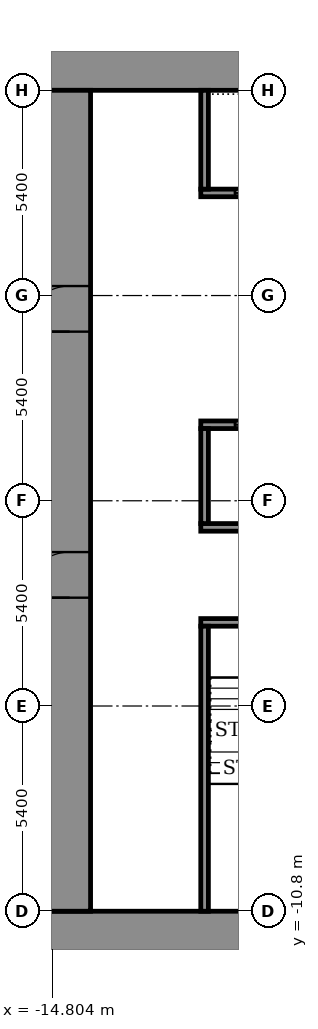
"""IFC4 building model, lengths in metres.
Left out: names, types, materials, properties, quantities, classifications, styles, units other than length and angle.
Written with IfcOpenShell. Run it as: python <this file> out.ifc"""

import sys

from ifc_helpers import new_model, si_unit, direction, frame, frame_2d, origin, place, context, subcontext, project, spatial, rectangle, extrude, element, fill, save


model = new_model("IFC4")
c1 = context("Model", 3, precision=1e-05, world=origin(), true_north=direction((0.0, 1.0)))
c2 = subcontext(c1, "Body", "Model", "MODEL_VIEW")
j1 = project(units=[si_unit("LENGTHUNIT", "METRE"), si_unit("PLANEANGLEUNIT", "RADIAN")], contexts=[c1])
p1 = place(None, origin())
s1 = spatial("IfcSite", under=j1, at=p1, CompositionType="ELEMENT")
p2 = place(p1, origin())
s2 = spatial("IfcBuilding", under=s1, at=p2, CompositionType="ELEMENT")
p3 = place(p2, frame((0.0, 0.0, 48.5)))
s3 = spatial("IfcBuildingStorey", under=s2, at=p3, CompositionType="ELEMENT", Elevation=48.5)
for number, where, z_axis, x_axis in (
    (1, (-14.9, -11.35, 0.0), (0.0, 0.0, 1.0), (1.0, 0.0, 0.0)),
    (2, (-14.9, 11.35, 0.0), (0.0, 0.0, 1.0), (1.0, 0.0, 0.0)),
):
    element("IfcWall", number, at=place(p3, frame(where, z_axis=z_axis, x_axis=x_axis)), inside=s3, PredefinedType="SHEAR", context=c2, shape_type="SweptSolid", body=[
        extrude(rectangle(XDim=29.8, YDim=1.1, at=frame_2d((14.9, 0.0))), origin(), (0.0, 0.0, 1.0), 3.6),
    ])
p4 = place(p3, frame((-14.35, -10.8, 0.0), z_axis=(0.0, 0.0, 1.0), x_axis=(0.0, 1.0, 0.0)))
e3 = element("IfcWall", 3, at=p4, inside=s3, PredefinedType="SHEAR", context=c2, shape_type="SweptSolid", body=[
    extrude(rectangle(XDim=21.6, YDim=1.1, at=frame_2d((10.8, 0.0))), origin(), (0.0, 0.0, 1.0), 3.6),
])
p5 = place(p4, frame((8.25, 0.0, 0.0)))
e4 = element("IfcOpeningElement", 4, at=p5, cuts=e3, PredefinedType="OPENING", context=c2, shape_type="SweptSolid", body=[
    extrude(rectangle(XDim=1.2, YDim=2.1, at=frame_2d((0.6, 1.05))), frame((0.0, 0.56, 0.0), z_axis=(0.0, -1.0, 0.0), x_axis=(1.0, 0.0, 0.0)), (0.0, 0.0, 1.0), 1.12),
])
p6 = place(p4, frame((15.25, 0.0, 0.0)))
e5 = element("IfcOpeningElement", 5, at=p6, cuts=e3, PredefinedType="OPENING", context=c2, shape_type="SweptSolid", body=[
    extrude(rectangle(XDim=1.2, YDim=2.1, at=frame_2d((0.6, 1.05))), frame((0.0, 0.56, 0.0), z_axis=(0.0, -1.0, 0.0), x_axis=(1.0, 0.0, 0.0)), (0.0, 0.0, 1.0), 1.12),
])
p7 = place(p3, frame((-10.9, -3.2, 0.0), z_axis=(0.0, 0.0, 1.0), x_axis=(1.0, 0.0, 0.0)))
e6 = element("IfcWall", 6, at=p7, inside=s3, PredefinedType="SHEAR", context=c2, shape_type="SweptSolid", body=[
    extrude(rectangle(XDim=21.8, YDim=0.2, at=frame_2d((10.9, 0.0))), origin(), (0.0, 0.0, 1.0), 3.05),
])
p8 = place(p7, frame((1.075, 0.0, 0.0)))
e7 = element("IfcOpeningElement", 7, at=p8, cuts=e6, PredefinedType="OPENING", context=c2, shape_type="SweptSolid", body=[
    extrude(rectangle(XDim=1.1, YDim=2.1, at=frame_2d((0.55, 1.05))), frame((0.0, 0.11, 0.0), z_axis=(0.0, -1.0, 0.0), x_axis=(1.0, 0.0, 0.0)), (0.0, 0.0, 1.0), 0.22),
])
p9 = place(p7, frame((10.325, 0.0, 0.0)))
e8 = element("IfcOpeningElement", 8, at=p9, cuts=e6, PredefinedType="OPENING", context=c2, shape_type="SweptSolid", body=[
    extrude(rectangle(XDim=1.1, YDim=2.1, at=frame_2d((0.55, 1.05))), frame((0.0, 0.11, 0.0), z_axis=(0.0, -1.0, 0.0), x_axis=(1.0, 0.0, 0.0)), (0.0, 0.0, 1.0), 0.22),
])
p10 = place(p7, frame((19.625, 0.0, 0.0)))
e9 = element("IfcOpeningElement", 9, at=p10, cuts=e6, PredefinedType="OPENING", context=c2, shape_type="SweptSolid", body=[
    extrude(rectangle(XDim=1.1, YDim=2.1, at=frame_2d((0.55, 1.05))), frame((0.0, 0.11, 0.0), z_axis=(0.0, -1.0, 0.0), x_axis=(1.0, 0.0, 0.0)), (0.0, 0.0, 1.0), 0.22),
])
p11 = place(p7, frame((5.7, 0.0, 0.0)))
e10 = element("IfcOpeningElement", 10, at=p11, cuts=e6, PredefinedType="OPENING", context=c2, shape_type="SweptSolid", body=[
    extrude(rectangle(XDim=1.1, YDim=2.1, at=frame_2d((0.55, 1.05))), frame((0.0, 0.11, 0.0), z_axis=(0.0, -1.0, 0.0), x_axis=(1.0, 0.0, 0.0)), (0.0, 0.0, 1.0), 0.22),
])
p12 = place(p7, frame((14.975, 0.0, 0.0)))
e11 = element("IfcOpeningElement", 11, at=p12, cuts=e6, PredefinedType="OPENING", context=c2, shape_type="SweptSolid", body=[
    extrude(rectangle(XDim=1.1, YDim=2.1, at=frame_2d((0.55, 1.05))), frame((0.0, 0.11, 0.0), z_axis=(0.0, -1.0, 0.0), x_axis=(1.0, 0.0, 0.0)), (0.0, 0.0, 1.0), 0.22),
])
p13 = place(p3, frame((-10.9, -0.7, 0.0), z_axis=(0.0, 0.0, 1.0), x_axis=(1.0, 0.0, 0.0)))
e12 = element("IfcWall", 12, at=p13, inside=s3, PredefinedType="SHEAR", context=c2, shape_type="SweptSolid", body=[
    extrude(rectangle(XDim=21.8, YDim=0.2, at=frame_2d((10.9, 0.0))), origin(), (0.0, 0.0, 1.0), 3.05),
])
p14 = place(p3, frame((-10.9, 2.0, 0.0), z_axis=(0.0, 0.0, 1.0), x_axis=(1.0, 0.0, 0.0)))
e13 = element("IfcWall", 13, at=p14, inside=s3, PredefinedType="SHEAR", context=c2, shape_type="SweptSolid", body=[
    extrude(rectangle(XDim=21.8, YDim=0.2, at=frame_2d((10.9, 0.0))), origin(), (0.0, 0.0, 1.0), 3.05),
])
p15 = place(p14, frame((0.9, 0.0, 0.0)))
e14 = element("IfcOpeningElement", 14, at=p15, cuts=e13, PredefinedType="OPENING", context=c2, shape_type="SweptSolid", body=[
    extrude(rectangle(XDim=1.1, YDim=2.1, at=frame_2d((0.55, 1.05))), frame((0.0, 0.11, 0.0), z_axis=(0.0, -1.0, 0.0), x_axis=(1.0, 0.0, 0.0)), (0.0, 0.0, 1.0), 0.22),
])
p16 = place(p14, frame((3.6, 0.0, 0.0)))
e15 = element("IfcOpeningElement", 15, at=p16, cuts=e13, PredefinedType="OPENING", context=c2, shape_type="SweptSolid", body=[
    extrude(rectangle(XDim=1.1, YDim=2.1, at=frame_2d((0.55, 1.05))), frame((0.0, 0.11, 0.0), z_axis=(0.0, -1.0, 0.0), x_axis=(1.0, 0.0, 0.0)), (0.0, 0.0, 1.0), 0.22),
])
p17 = place(p14, frame((6.3, 0.0, 0.0)))
e16 = element("IfcOpeningElement", 16, at=p17, cuts=e13, PredefinedType="OPENING", context=c2, shape_type="SweptSolid", body=[
    extrude(rectangle(XDim=1.1, YDim=2.1, at=frame_2d((0.55, 1.05))), frame((0.0, 0.11, 0.0), z_axis=(0.0, -1.0, 0.0), x_axis=(1.0, 0.0, 0.0)), (0.0, 0.0, 1.0), 0.22),
])
p18 = place(p14, frame((9.0, 0.0, 0.0)))
e17 = element("IfcOpeningElement", 17, at=p18, cuts=e13, PredefinedType="OPENING", context=c2, shape_type="SweptSolid", body=[
    extrude(rectangle(XDim=1.1, YDim=2.1, at=frame_2d((0.55, 1.05))), frame((0.0, 0.11, 0.0), z_axis=(0.0, -1.0, 0.0), x_axis=(1.0, 0.0, 0.0)), (0.0, 0.0, 1.0), 0.22),
])
p19 = place(p14, frame((11.7, 0.0, 0.0)))
e18 = element("IfcOpeningElement", 18, at=p19, cuts=e13, PredefinedType="OPENING", context=c2, shape_type="SweptSolid", body=[
    extrude(rectangle(XDim=1.1, YDim=2.1, at=frame_2d((0.55, 1.05))), frame((0.0, 0.11, 0.0), z_axis=(0.0, -1.0, 0.0), x_axis=(1.0, 0.0, 0.0)), (0.0, 0.0, 1.0), 0.22),
])
p20 = place(p14, frame((17.2, 0.0, 0.0)))
e19 = element("IfcOpeningElement", 19, at=p20, cuts=e13, PredefinedType="OPENING", context=c2, shape_type="SweptSolid", body=[
    extrude(rectangle(XDim=0.9, YDim=2.1, at=frame_2d((0.45, 1.05))), frame((0.0, 0.11, 0.0), z_axis=(0.0, -1.0, 0.0), x_axis=(1.0, 0.0, 0.0)), (0.0, 0.0, 1.0), 0.22),
])
p21 = place(p3, frame((-10.9, 8.1, 0.0), z_axis=(0.0, 0.0, 1.0), x_axis=(1.0, 0.0, 0.0)))
e20 = element("IfcWall", 20, at=p21, inside=s3, PredefinedType="SHEAR", context=c2, shape_type="SweptSolid", body=[
    extrude(rectangle(XDim=21.8, YDim=0.2, at=frame_2d((10.9, 0.0))), origin(), (0.0, 0.0, 1.0), 3.05),
])
p22 = place(p21, frame((0.9, 0.0, 0.0)))
e21 = element("IfcOpeningElement", 21, at=p22, cuts=e20, PredefinedType="OPENING", context=c2, shape_type="SweptSolid", body=[
    extrude(rectangle(XDim=1.1, YDim=2.1, at=frame_2d((0.55, 1.05))), frame((0.0, 0.11, 0.0), z_axis=(0.0, -1.0, 0.0), x_axis=(1.0, 0.0, 0.0)), (0.0, 0.0, 1.0), 0.22),
])
p23 = place(p21, frame((3.6, 0.0, 0.0)))
e22 = element("IfcOpeningElement", 22, at=p23, cuts=e20, PredefinedType="OPENING", context=c2, shape_type="SweptSolid", body=[
    extrude(rectangle(XDim=1.1, YDim=2.1, at=frame_2d((0.55, 1.05))), frame((0.0, 0.11, 0.0), z_axis=(0.0, -1.0, 0.0), x_axis=(1.0, 0.0, 0.0)), (0.0, 0.0, 1.0), 0.22),
])
p24 = place(p21, frame((6.3, 0.0, 0.0)))
e23 = element("IfcOpeningElement", 23, at=p24, cuts=e20, PredefinedType="OPENING", context=c2, shape_type="SweptSolid", body=[
    extrude(rectangle(XDim=1.1, YDim=2.1, at=frame_2d((0.55, 1.05))), frame((0.0, 0.11, 0.0), z_axis=(0.0, -1.0, 0.0), x_axis=(1.0, 0.0, 0.0)), (0.0, 0.0, 1.0), 0.22),
])
p25 = place(p21, frame((9.0, 0.0, 0.0)))
e24 = element("IfcOpeningElement", 24, at=p25, cuts=e20, PredefinedType="OPENING", context=c2, shape_type="SweptSolid", body=[
    extrude(rectangle(XDim=1.1, YDim=2.1, at=frame_2d((0.55, 1.05))), frame((0.0, 0.11, 0.0), z_axis=(0.0, -1.0, 0.0), x_axis=(1.0, 0.0, 0.0)), (0.0, 0.0, 1.0), 0.22),
])
p26 = place(p21, frame((11.7, 0.0, 0.0)))
e25 = element("IfcOpeningElement", 25, at=p26, cuts=e20, PredefinedType="OPENING", context=c2, shape_type="SweptSolid", body=[
    extrude(rectangle(XDim=1.1, YDim=2.1, at=frame_2d((0.55, 1.05))), frame((0.0, 0.11, 0.0), z_axis=(0.0, -1.0, 0.0), x_axis=(1.0, 0.0, 0.0)), (0.0, 0.0, 1.0), 0.22),
])
p27 = place(p21, frame((14.5, 0.0, 0.0)))
e26 = element("IfcOpeningElement", 26, at=p27, cuts=e20, PredefinedType="OPENING", context=c2, shape_type="SweptSolid", body=[
    extrude(rectangle(XDim=0.9, YDim=2.1, at=frame_2d((0.45, 1.05))), frame((0.0, 0.11, 0.0), z_axis=(0.0, -1.0, 0.0), x_axis=(1.0, 0.0, 0.0)), (0.0, 0.0, 1.0), 0.22),
])
p28 = place(p21, frame((18.55, 0.0, 0.0)))
e27 = element("IfcOpeningElement", 27, at=p28, cuts=e20, PredefinedType="OPENING", context=c2, shape_type="SweptSolid", body=[
    extrude(rectangle(XDim=0.9, YDim=2.1, at=frame_2d((0.45, 1.05))), frame((0.0, 0.11, 0.0), z_axis=(0.0, -1.0, 0.0), x_axis=(1.0, 0.0, 0.0)), (0.0, 0.0, 1.0), 0.22),
])
p29 = place(p3, frame((-10.8, -10.8, 0.0), z_axis=(0.0, 0.0, 1.0), x_axis=(0.0, 1.0, 0.0)))
e28 = element("IfcWall", 28, at=p29, inside=s3, PredefinedType="SHEAR", context=c2, shape_type="SweptSolid", body=[
    extrude(rectangle(XDim=7.5, YDim=0.2, at=frame_2d((3.75, 0.0))), origin(), (0.0, 0.0, 1.0), 3.05),
])
p30 = place(p3, frame((-10.8, -0.6, 0.0), z_axis=(0.0, 0.0, 1.0), x_axis=(0.0, 1.0, 0.0)))
e29 = element("IfcWall", 29, at=p30, inside=s3, PredefinedType="SHEAR", context=c2, shape_type="SweptSolid", body=[
    extrude(rectangle(XDim=2.5, YDim=0.2, at=frame_2d((1.25, 0.0))), origin(), (0.0, 0.0, 1.0), 3.05),
])
p31 = place(p3, frame((-10.8, 8.2, 0.0), z_axis=(0.0, 0.0, 1.0), x_axis=(0.0, 1.0, 0.0)))
e30 = element("IfcWall", 30, at=p31, inside=s3, PredefinedType="SHEAR", context=c2, shape_type="SweptSolid", body=[
    extrude(rectangle(XDim=2.6, YDim=0.2, at=frame_2d((1.3, 0.0))), origin(), (0.0, 0.0, 1.0), 3.05),
])
p32 = place(p5, origin())
e31 = element("IfcDoor", 31, at=p32, inside=s3, OperationType="DOUBLE_DOOR_SINGLE_SWING", PredefinedType="DOOR", context=c2, shape_type="SweptSolid", body=[
    extrude(rectangle(XDim=1.2, YDim=2.1, at=frame_2d((0.6, 1.05))), frame((0.0, 0.025, 0.0), z_axis=(0.0, -1.0, 0.0), x_axis=(1.0, 0.0, 0.0)), (0.0, 0.0, 1.0), 0.05),
])
fill(e4, e31)
p33 = place(p6, origin())
e32 = element("IfcDoor", 32, at=p33, inside=s3, OperationType="DOUBLE_DOOR_SINGLE_SWING", PredefinedType="DOOR", context=c2, shape_type="SweptSolid", body=[
    extrude(rectangle(XDim=1.2, YDim=2.1, at=frame_2d((0.6, 1.05))), frame((0.0, 0.025, 0.0), z_axis=(0.0, -1.0, 0.0), x_axis=(1.0, 0.0, 0.0)), (0.0, 0.0, 1.0), 0.05),
])
fill(e5, e32)
p34 = place(p15, origin())
e33 = element("IfcDoor", 33, at=p34, inside=s3, OperationType="SLIDING_TO_LEFT", PredefinedType="DOOR", context=c2, shape_type="SweptSolid", body=[
    extrude(rectangle(XDim=1.1, YDim=2.1, at=frame_2d((0.55, 1.05))), frame((0.0, 0.025, 0.0), z_axis=(0.0, -1.0, 0.0), x_axis=(1.0, 0.0, 0.0)), (0.0, 0.0, 1.0), 0.05),
])
fill(e14, e33)
p35 = place(p22, origin())
e34 = element("IfcDoor", 34, at=p35, inside=s3, OperationType="SLIDING_TO_LEFT", PredefinedType="DOOR", context=c2, shape_type="SweptSolid", body=[
    extrude(rectangle(XDim=1.1, YDim=2.1, at=frame_2d((0.55, 1.05))), frame((0.0, 0.025, 0.0), z_axis=(0.0, -1.0, 0.0), x_axis=(1.0, 0.0, 0.0)), (0.0, 0.0, 1.0), 0.05),
])
fill(e21, e34)
save(model, sys.argv[1])
